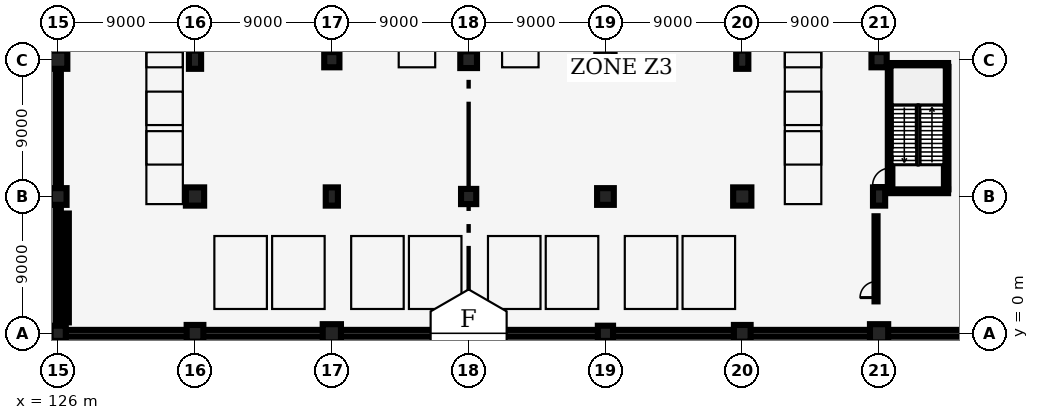
"""IFC4 building model, lengths in metres.
Left out: names, types, materials, properties, quantities, classifications, styles, units other than length and angle.
Written with IfcOpenShell. Run it as: python <this file> out.ifc"""

import sys

from ifc_helpers import new_model, si_unit, direction, frame, frame_2d, origin, origin_2d, place, context, subcontext, project, spatial, rectangle, extrude, element, fill, save


model = new_model("IFC4")
c1 = context("Model", 3, precision=1e-05, world=origin(), true_north=direction((0.0, 1.0)))
c2 = subcontext(c1, "Body", "Model", "MODEL_VIEW")
j1 = project(units=[si_unit("LENGTHUNIT", "METRE"), si_unit("PLANEANGLEUNIT", "RADIAN")], contexts=[c1])
p1 = place(None, origin())
s1 = spatial("IfcSite", under=j1, at=p1, CompositionType="ELEMENT")
p2 = place(p1, origin())
s2 = spatial("IfcBuilding", under=s1, at=p2, CompositionType="ELEMENT")
p3 = place(p2, frame((0.0, 0.0, -5.0)))
s3 = spatial("IfcBuildingStorey", under=s2, at=p3, CompositionType="ELEMENT", Elevation=-5.0)
p4 = place(p3, frame((126.0, 0.0, 0.0), z_axis=(0.0, 0.0, 1.0), x_axis=(1.0, 0.0, 0.0)))
e1 = element("IfcColumn", 1, at=p4, inside=s3, PredefinedType="COLUMN", context=c2, shape_type="SweptSolid", body=[
    extrude(rectangle(XDim=1.0, YDim=1.0, at=origin_2d()), origin(), (0.0, 0.0, 1.0), 5.0),
])
p5 = place(p3, frame((126.0, 9.0, 0.0), z_axis=(0.0, 0.0, 1.0), x_axis=(1.0, 0.0, 0.0)))
e2 = element("IfcColumn", 2, at=p5, inside=s3, PredefinedType="COLUMN", context=c2, shape_type="SweptSolid", body=[
    extrude(rectangle(XDim=1.1, YDim=1.1, at=origin_2d()), origin(), (0.0, 0.0, 1.0), 5.0),
])
p6 = place(p3, frame((126.0, 18.0, 0.0), z_axis=(0.0, 0.0, 1.0), x_axis=(1.0, 0.0, 0.0)))
e3 = element("IfcColumn", 3, at=p6, inside=s3, PredefinedType="COLUMN", context=c2, shape_type="SweptSolid", body=[
    extrude(rectangle(XDim=1.2, YDim=1.2, at=origin_2d()), origin(), (0.0, 0.0, 1.0), 5.0),
])
p7 = place(p3, frame((135.0, 0.0, 0.0), z_axis=(0.0, 0.0, 1.0), x_axis=(1.0, 0.0, 0.0)))
e4 = element("IfcColumn", 4, at=p7, inside=s3, PredefinedType="COLUMN", context=c2, shape_type="SweptSolid", body=[
    extrude(rectangle(XDim=1.1, YDim=1.1, at=origin_2d()), origin(), (0.0, 0.0, 1.0), 5.0),
])
p8 = place(p3, frame((135.0, 9.0, 0.0), z_axis=(0.0, 0.0, 1.0), x_axis=(1.0, 0.0, 0.0)))
e5 = element("IfcColumn", 5, at=p8, inside=s3, PredefinedType="COLUMN", context=c2, shape_type="SweptSolid", body=[
    extrude(rectangle(XDim=1.2, YDim=1.2, at=origin_2d()), origin(), (0.0, 0.0, 1.0), 5.0),
])
p9 = place(p3, frame((135.0, 18.0, 0.0), z_axis=(0.0, 0.0, 1.0), x_axis=(1.0, 0.0, 0.0)))
e6 = element("IfcColumn", 6, at=p9, inside=s3, PredefinedType="COLUMN", context=c2, shape_type="SweptSolid", body=[
    extrude(rectangle(XDim=0.8, YDim=1.2, at=origin_2d()), origin(), (0.0, 0.0, 1.0), 5.0),
])
p10 = place(p3, frame((144.0, 0.0, 0.0), z_axis=(0.0, 0.0, 1.0), x_axis=(1.0, 0.0, 0.0)))
e7 = element("IfcColumn", 7, at=p10, inside=s3, PredefinedType="COLUMN", context=c2, shape_type="SweptSolid", body=[
    extrude(rectangle(XDim=1.2, YDim=1.2, at=origin_2d()), origin(), (0.0, 0.0, 1.0), 5.0),
])
p11 = place(p3, frame((144.0, 9.0, 0.0), z_axis=(0.0, 0.0, 1.0), x_axis=(1.0, 0.0, 0.0)))
e8 = element("IfcColumn", 8, at=p11, inside=s3, PredefinedType="COLUMN", context=c2, shape_type="SweptSolid", body=[
    extrude(rectangle(XDim=0.8, YDim=1.2, at=origin_2d()), origin(), (0.0, 0.0, 1.0), 5.0),
])
p12 = place(p3, frame((144.0, 18.0, 0.0), z_axis=(0.0, 0.0, 1.0), x_axis=(1.0, 0.0, 0.0)))
e9 = element("IfcColumn", 9, at=p12, inside=s3, PredefinedType="COLUMN", context=c2, shape_type="SweptSolid", body=[
    extrude(rectangle(XDim=1.0, YDim=1.0, at=origin_2d()), origin(), (0.0, 0.0, 1.0), 5.0),
])
p13 = place(p3, frame((153.0, 0.0, 0.0), z_axis=(0.0, 0.0, 1.0), x_axis=(1.0, 0.0, 0.0)))
e10 = element("IfcColumn", 10, at=p13, inside=s3, PredefinedType="COLUMN", context=c2, shape_type="SweptSolid", body=[
    extrude(rectangle(XDim=0.8, YDim=1.2, at=origin_2d()), origin(), (0.0, 0.0, 1.0), 5.0),
])
p14 = place(p3, frame((153.0, 9.0, 0.0), z_axis=(0.0, 0.0, 1.0), x_axis=(1.0, 0.0, 0.0)))
e11 = element("IfcColumn", 11, at=p14, inside=s3, PredefinedType="COLUMN", context=c2, shape_type="SweptSolid", body=[
    extrude(rectangle(XDim=1.0, YDim=1.0, at=origin_2d()), origin(), (0.0, 0.0, 1.0), 5.0),
])
p15 = place(p3, frame((153.0, 18.0, 0.0), z_axis=(0.0, 0.0, 1.0), x_axis=(1.0, 0.0, 0.0)))
e12 = element("IfcColumn", 12, at=p15, inside=s3, PredefinedType="COLUMN", context=c2, shape_type="SweptSolid", body=[
    extrude(rectangle(XDim=1.1, YDim=1.1, at=origin_2d()), origin(), (0.0, 0.0, 1.0), 5.0),
])
p16 = place(p3, frame((162.0, 0.0, 0.0), z_axis=(0.0, 0.0, 1.0), x_axis=(1.0, 0.0, 0.0)))
e13 = element("IfcColumn", 13, at=p16, inside=s3, PredefinedType="COLUMN", context=c2, shape_type="SweptSolid", body=[
    extrude(rectangle(XDim=1.0, YDim=1.0, at=origin_2d()), origin(), (0.0, 0.0, 1.0), 5.0),
])
p17 = place(p3, frame((162.0, 9.0, 0.0), z_axis=(0.0, 0.0, 1.0), x_axis=(1.0, 0.0, 0.0)))
e14 = element("IfcColumn", 14, at=p17, inside=s3, PredefinedType="COLUMN", context=c2, shape_type="SweptSolid", body=[
    extrude(rectangle(XDim=1.1, YDim=1.1, at=origin_2d()), origin(), (0.0, 0.0, 1.0), 5.0),
])
p18 = place(p3, frame((162.0, 18.0, 0.0), z_axis=(0.0, 0.0, 1.0), x_axis=(1.0, 0.0, 0.0)))
e15 = element("IfcColumn", 15, at=p18, inside=s3, PredefinedType="COLUMN", context=c2, shape_type="SweptSolid", body=[
    extrude(rectangle(XDim=1.2, YDim=1.2, at=origin_2d()), origin(), (0.0, 0.0, 1.0), 5.0),
])
p19 = place(p3, frame((171.0, 0.0, 0.0), z_axis=(0.0, 0.0, 1.0), x_axis=(1.0, 0.0, 0.0)))
e16 = element("IfcColumn", 16, at=p19, inside=s3, PredefinedType="COLUMN", context=c2, shape_type="SweptSolid", body=[
    extrude(rectangle(XDim=1.1, YDim=1.1, at=origin_2d()), origin(), (0.0, 0.0, 1.0), 5.0),
])
p20 = place(p3, frame((171.0, 9.0, 0.0), z_axis=(0.0, 0.0, 1.0), x_axis=(1.0, 0.0, 0.0)))
e17 = element("IfcColumn", 17, at=p20, inside=s3, PredefinedType="COLUMN", context=c2, shape_type="SweptSolid", body=[
    extrude(rectangle(XDim=1.2, YDim=1.2, at=origin_2d()), origin(), (0.0, 0.0, 1.0), 5.0),
])
p21 = place(p3, frame((171.0, 18.0, 0.0), z_axis=(0.0, 0.0, 1.0), x_axis=(1.0, 0.0, 0.0)))
e18 = element("IfcColumn", 18, at=p21, inside=s3, PredefinedType="COLUMN", context=c2, shape_type="SweptSolid", body=[
    extrude(rectangle(XDim=0.8, YDim=1.2, at=origin_2d()), origin(), (0.0, 0.0, 1.0), 5.0),
])
p22 = place(p3, frame((180.0, 0.0, 0.0), z_axis=(0.0, 0.0, 1.0), x_axis=(1.0, 0.0, 0.0)))
e19 = element("IfcColumn", 19, at=p22, inside=s3, PredefinedType="COLUMN", context=c2, shape_type="SweptSolid", body=[
    extrude(rectangle(XDim=1.2, YDim=1.2, at=origin_2d()), origin(), (0.0, 0.0, 1.0), 5.0),
])
p23 = place(p3, frame((180.0, 9.0, 0.0), z_axis=(0.0, 0.0, 1.0), x_axis=(1.0, 0.0, 0.0)))
e20 = element("IfcColumn", 20, at=p23, inside=s3, PredefinedType="COLUMN", context=c2, shape_type="SweptSolid", body=[
    extrude(rectangle(XDim=0.8, YDim=1.2, at=origin_2d()), origin(), (0.0, 0.0, 1.0), 5.0),
])
p24 = place(p3, frame((180.0, 18.0, 0.0), z_axis=(0.0, 0.0, 1.0), x_axis=(1.0, 0.0, 0.0)))
e21 = element("IfcColumn", 21, at=p24, inside=s3, PredefinedType="COLUMN", context=c2, shape_type="SweptSolid", body=[
    extrude(rectangle(XDim=1.0, YDim=1.0, at=origin_2d()), origin(), (0.0, 0.0, 1.0), 5.0),
])
p25 = place(p3, frame((126.0, 0.495, 0.0), z_axis=(0.0, 0.0, 1.0), x_axis=(0.0, 1.0, 0.0)))
e22 = element("IfcWall", 22, at=p25, inside=s3, PredefinedType="SHEAR", context=c2, shape_type="SweptSolid", body=[
    extrude(rectangle(XDim=35.01, YDim=0.35, at=frame_2d((17.505, 0.0))), origin(), (0.0, 0.0, 1.0), 3.95),
])
p26 = place(p3, frame((126.495, 0.0, 0.0), z_axis=(0.0, 0.0, 1.0), x_axis=(1.0, 0.0, 0.0)))
e23 = element("IfcWall", 23, at=p26, inside=s3, PredefinedType="SHEAR", context=c2, shape_type="SweptSolid", body=[
    extrude(rectangle(XDim=64.91, YDim=0.45, at=frame_2d((32.455, 0.0))), origin(), (0.0, 0.0, 1.0), 3.95),
])
p27 = place(p3, frame((180.725, 9.47, 0.0), z_axis=(0.0, 0.0, 1.0), x_axis=(0.0, 1.0, 0.0)))
e24 = element("IfcWall", 24, at=p27, inside=s3, PredefinedType="SHEAR", context=c2, shape_type="SweptSolid", body=[
    extrude(rectangle(XDim=8.06, YDim=0.3, at=frame_2d((4.03, 0.0))), origin(), (0.0, 0.0, 1.0), 4.64),
])
p28 = place(p27, frame((0.25, 0.0, 0.0)))
e25 = element("IfcOpeningElement", 25, at=p28, cuts=e24, PredefinedType="OPENING", context=c2, shape_type="SweptSolid", body=[
    extrude(rectangle(XDim=1.15, YDim=2.15, at=frame_2d((0.575, 1.075))), frame((0.0, 0.16, 0.0), z_axis=(0.0, -1.0, 0.0), x_axis=(1.0, 0.0, 0.0)), (0.0, 0.0, 1.0), 0.32),
])
p29 = place(p3, frame((184.415, 9.47, 0.0), z_axis=(0.0, 0.0, 1.0), x_axis=(0.0, 1.0, 0.0)))
e26 = element("IfcWall", 26, at=p29, inside=s3, PredefinedType="SHEAR", context=c2, shape_type="SweptSolid", body=[
    extrude(rectangle(XDim=8.06, YDim=0.3, at=frame_2d((4.03, 0.0))), origin(), (0.0, 0.0, 1.0), 4.64),
])
for number, where, z_axis, x_axis in (
    (27, (180.6, 9.345, 0.0), (0.0, 0.0, 1.0), (1.0, 0.0, 0.0)),
    (28, (180.6, 17.655, 0.0), (0.0, 0.0, 1.0), (1.0, 0.0, 0.0)),
):
    element("IfcWall", number, at=place(p3, frame(where, z_axis=z_axis, x_axis=x_axis)), inside=s3, PredefinedType="SHEAR", context=c2, shape_type="SweptSolid", body=[
        extrude(rectangle(XDim=3.94, YDim=0.25, at=frame_2d((1.97, 0.0))), origin(), (0.0, 0.0, 1.0), 4.64),
    ])
p30 = place(p3, frame((179.8, 2.1, 0.0), z_axis=(0.0, 0.0, 1.0), x_axis=(0.0, 1.0, 0.0)))
e29 = element("IfcWall", 29, at=p30, inside=s3, PredefinedType="SOLIDWALL", context=c2, shape_type="SweptSolid", body=[
    extrude(rectangle(XDim=5.6, YDim=0.2, at=frame_2d((2.8, 0.0))), origin(), (0.0, 0.0, 1.0), 3.85),
])
p31 = place(p30, frame((0.25, 0.0, 0.0)))
e30 = element("IfcOpeningElement", 30, at=p31, cuts=e29, PredefinedType="OPENING", context=c2, shape_type="SweptSolid", body=[
    extrude(rectangle(XDim=1.05, YDim=2.15, at=frame_2d((0.525, 1.075))), frame((0.0, 0.11, 0.0), z_axis=(0.0, -1.0, 0.0), x_axis=(1.0, 0.0, 0.0)), (0.0, 0.0, 1.0), 0.22),
])
p32 = place(p3, frame((126.6, 0.72, 0.0), z_axis=(0.0, 0.0, 1.0), x_axis=(0.0, 1.0, 0.0)))
e31 = element("IfcWall", 31, at=p32, inside=s3, PredefinedType="SOLIDWALL", context=c2, shape_type="SweptSolid", body=[
    extrude(rectangle(XDim=7.16, YDim=0.2, at=frame_2d((3.58, 0.0))), origin(), (0.0, 0.0, 1.0), 3.85),
])
p33 = place(p28, origin())
e32 = element("IfcDoor", 32, at=p33, inside=s3, OperationType="SINGLE_SWING_LEFT", PredefinedType="DOOR", context=c2, shape_type="SweptSolid", body=[
    extrude(rectangle(XDim=1.15, YDim=2.15, at=frame_2d((0.575, 1.075))), frame((0.0, 0.025, 0.0), z_axis=(0.0, -1.0, 0.0), x_axis=(1.0, 0.0, 0.0)), (0.0, 0.0, 1.0), 0.05),
])
fill(e25, e32)
p34 = place(p31, origin())
e33 = element("IfcDoor", 33, at=p34, inside=s3, OperationType="SINGLE_SWING_LEFT", PredefinedType="DOOR", context=c2, shape_type="SweptSolid", body=[
    extrude(rectangle(XDim=1.05, YDim=2.15, at=frame_2d((0.525, 1.075))), frame((0.0, 0.025, 0.0), z_axis=(0.0, -1.0, 0.0), x_axis=(1.0, 0.0, 0.0)), (0.0, 0.0, 1.0), 0.05),
])
fill(e30, e33)
save(model, sys.argv[1])
